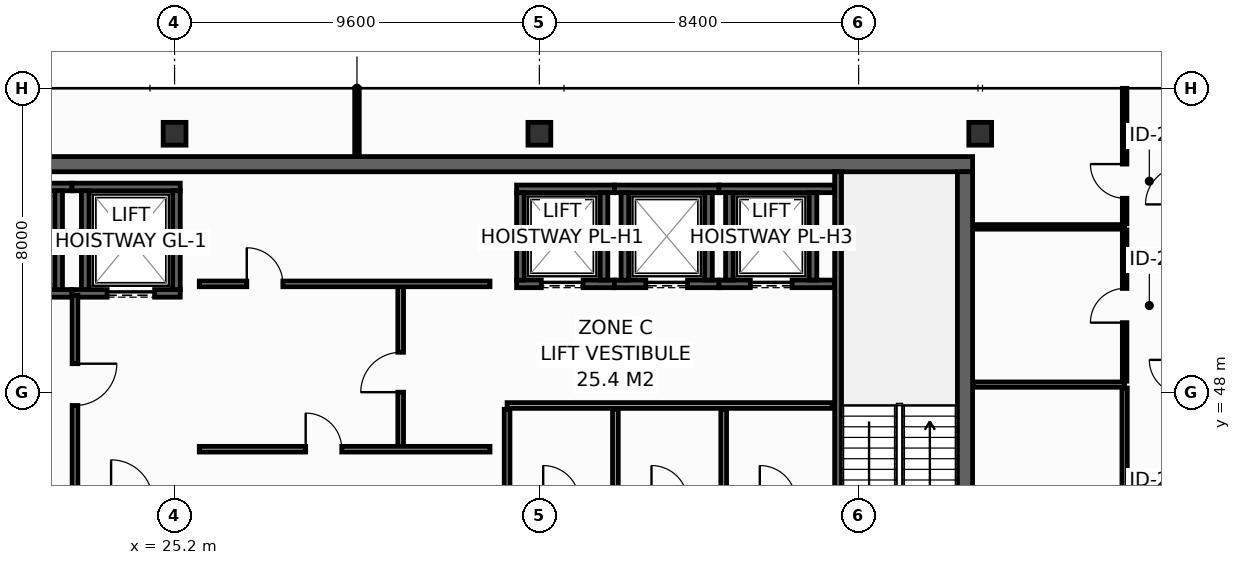
"""IFC4 building model, lengths in metres.
Left out: names, types, materials, properties, quantities, classifications, styles, units other than length and angle.
Written with IfcOpenShell. Run it as: python <this file> out.ifc"""

import sys

from ifc_helpers import new_model, si_unit, direction, frame, frame_2d, origin, origin_2d, place, context, subcontext, project, spatial, rectangle, hollow_rectangle, extrude, element, fill, save


model = new_model("IFC4")
c1 = context("Model", 3, precision=1e-05, world=origin(), true_north=direction((0.0, 1.0)))
c2 = subcontext(c1, "Body", "Model", "MODEL_VIEW")
j1 = project(units=[si_unit("LENGTHUNIT", "METRE"), si_unit("PLANEANGLEUNIT", "RADIAN")], contexts=[c1])
p1 = place(None, origin())
s1 = spatial("IfcSite", under=j1, at=p1, CompositionType="ELEMENT")
p2 = place(p1, origin())
s2 = spatial("IfcBuilding", under=s1, at=p2, CompositionType="ELEMENT")
p3 = place(p2, frame((0.0, 0.0, 268.6)))
s3 = spatial("IfcBuildingStorey", under=s2, at=p3, CompositionType="ELEMENT", Elevation=268.6)
p4 = place(p3, frame((13.7, 54.0, 0.0), z_axis=(0.0, 0.0, 1.0), x_axis=(1.0, 0.0, 0.0)))
e1 = element("IfcWall", 1, at=p4, inside=s3, PredefinedType="SHEAR", context=c2, shape_type="SweptSolid", body=[
    extrude(rectangle(XDim=32.5, YDim=0.4, at=frame_2d((16.25, 0.0))), origin(), (0.0, 0.0, 1.0), 3.55),
])
p5 = place(p3, frame((46.0, 43.4, 0.0), z_axis=(0.0, 0.0, 1.0), x_axis=(0.0, 1.0, 0.0)))
e2 = element("IfcWall", 2, at=p5, inside=s3, PredefinedType="SHEAR", context=c2, shape_type="SweptSolid", body=[
    extrude(rectangle(XDim=10.4, YDim=0.4, at=frame_2d((5.2, 0.0))), origin(), (0.0, 0.0, 1.0), 3.55),
])
for number, where, z_axis, x_axis in (
    (3, (25.2, 54.8, 0.0), (0.0, 0.0, 1.0), (1.0, 0.0, 0.0)),
    (4, (34.8, 54.8, 0.0), (0.0, 0.0, 1.0), (1.0, 0.0, 0.0)),
    (5, (46.4, 54.8, 0.0), (0.0, 0.0, 1.0), (1.0, 0.0, 0.0)),
):
    element("IfcColumn", number, at=place(p3, frame(where, z_axis=z_axis, x_axis=x_axis)), inside=s3, PredefinedType="COLUMN", context=c2, shape_type="SweptSolid", body=[
        extrude(hollow_rectangle(XDim=0.6, YDim=0.6, WallThickness=0.028, at=origin_2d()), origin(), (0.0, 0.0, 1.0), 3.8),
    ])
p6 = place(p3, frame((19.85, 50.6, 0.0), z_axis=(0.0, 0.0, 1.0), x_axis=(1.0, 0.0, 0.0)))
e6 = element("IfcWall", 6, at=p6, inside=s3, PredefinedType="SHEAR", context=c2, shape_type="SweptSolid", body=[
    extrude(rectangle(XDim=2.65, YDim=0.2, at=frame_2d((1.325, 0.0))), origin(), (0.0, 0.0, 1.0), 3.55),
])
p7 = place(p6, frame((0.675, 0.0, 0.0)))
e7 = element("IfcOpeningElement", 7, at=p7, cuts=e6, PredefinedType="OPENING", context=c2, shape_type="SweptSolid", body=[
    extrude(rectangle(XDim=1.25, YDim=2.3, at=frame_2d((0.625, 1.15))), frame((0.0, 0.11, 0.0), z_axis=(0.0, -1.0, 0.0), x_axis=(1.0, 0.0, 0.0)), (0.0, 0.0, 1.0), 0.22),
])
p8 = place(p3, frame((19.85, 53.4, 0.0), z_axis=(0.0, 0.0, 1.0), x_axis=(1.0, 0.0, 0.0)))
e8 = element("IfcWall", 8, at=p8, inside=s3, PredefinedType="SHEAR", context=c2, shape_type="SweptSolid", body=[
    extrude(rectangle(XDim=2.65, YDim=0.2, at=frame_2d((1.325, 0.0))), origin(), (0.0, 0.0, 1.0), 3.55),
])
p9 = place(p3, frame((22.15, 50.7, 0.0), z_axis=(0.0, 0.0, 1.0), x_axis=(0.0, 1.0, 0.0)))
e9 = element("IfcWall", 9, at=p9, inside=s3, PredefinedType="SHEAR", context=c2, shape_type="SweptSolid", body=[
    extrude(rectangle(XDim=2.6, YDim=0.2, at=frame_2d((1.3, 0.0))), origin(), (0.0, 0.0, 1.0), 3.55),
])
p10 = place(p3, frame((22.5, 50.6, 0.0), z_axis=(0.0, 0.0, 1.0), x_axis=(1.0, 0.0, 0.0)))
e10 = element("IfcWall", 10, at=p10, inside=s3, PredefinedType="SHEAR", context=c2, shape_type="SweptSolid", body=[
    extrude(rectangle(XDim=2.85, YDim=0.2, at=frame_2d((1.425, 0.0))), origin(), (0.0, 0.0, 1.0), 3.55),
])
p11 = place(p10, frame((0.925, 0.0, 0.0)))
e11 = element("IfcOpeningElement", 11, at=p11, cuts=e10, PredefinedType="OPENING", context=c2, shape_type="SweptSolid", body=[
    extrude(rectangle(XDim=1.25, YDim=2.3, at=frame_2d((0.625, 1.15))), frame((0.0, 0.11, 0.0), z_axis=(0.0, -1.0, 0.0), x_axis=(1.0, 0.0, 0.0)), (0.0, 0.0, 1.0), 0.22),
])
p12 = place(p3, frame((22.5, 53.4, 0.0), z_axis=(0.0, 0.0, 1.0), x_axis=(1.0, 0.0, 0.0)))
e12 = element("IfcWall", 12, at=p12, inside=s3, PredefinedType="SHEAR", context=c2, shape_type="SweptSolid", body=[
    extrude(rectangle(XDim=2.85, YDim=0.2, at=frame_2d((1.425, 0.0))), origin(), (0.0, 0.0, 1.0), 3.55),
])
for number, where, z_axis, x_axis in (
    (13, (22.85, 50.7, 0.0), (0.0, 0.0, 1.0), (0.0, 1.0, 0.0)),
    (14, (25.25, 50.7, 0.0), (0.0, 0.0, 1.0), (0.0, 1.0, 0.0)),
):
    element("IfcWall", number, at=place(p3, frame(where, z_axis=z_axis, x_axis=x_axis)), inside=s3, PredefinedType="SHEAR", context=c2, shape_type="SweptSolid", body=[
        extrude(rectangle(XDim=2.6, YDim=0.2, at=frame_2d((1.3, 0.0))), origin(), (0.0, 0.0, 1.0), 3.55),
    ])
p13 = place(p3, frame((34.2, 50.85, 0.0), z_axis=(0.0, 0.0, 1.0), x_axis=(1.0, 0.0, 0.0)))
e15 = element("IfcWall", 15, at=p13, inside=s3, PredefinedType="SHEAR", context=c2, shape_type="SweptSolid", body=[
    extrude(rectangle(XDim=2.575, YDim=0.2, at=frame_2d((1.288, 0.0))), origin(), (0.0, 0.0, 1.0), 3.55),
])
p14 = place(p13, frame((0.65, 0.0, 0.0)))
e16 = element("IfcOpeningElement", 16, at=p14, cuts=e15, PredefinedType="OPENING", context=c2, shape_type="SweptSolid", body=[
    extrude(rectangle(XDim=1.1, YDim=2.2, at=frame_2d((0.55, 1.1))), frame((0.0, 0.11, 0.0), z_axis=(0.0, -1.0, 0.0), x_axis=(1.0, 0.0, 0.0)), (0.0, 0.0, 1.0), 0.22),
])
p15 = place(p3, frame((34.2, 53.35, 0.0), z_axis=(0.0, 0.0, 1.0), x_axis=(1.0, 0.0, 0.0)))
e17 = element("IfcWall", 17, at=p15, inside=s3, PredefinedType="SHEAR", context=c2, shape_type="SweptSolid", body=[
    extrude(rectangle(XDim=2.575, YDim=0.2, at=frame_2d((1.288, 0.0))), origin(), (0.0, 0.0, 1.0), 3.55),
])
for number, where, z_axis, x_axis in (
    (18, (34.3, 50.95, 0.0), (0.0, 0.0, 1.0), (0.0, 1.0, 0.0)),
    (19, (36.5, 50.95, 0.0), (0.0, 0.0, 1.0), (0.0, 1.0, 0.0)),
):
    element("IfcWall", number, at=place(p3, frame(where, z_axis=z_axis, x_axis=x_axis)), inside=s3, PredefinedType="SHEAR", context=c2, shape_type="SweptSolid", body=[
        extrude(rectangle(XDim=2.3, YDim=0.2, at=frame_2d((1.15, 0.0))), origin(), (0.0, 0.0, 1.0), 3.55),
    ])
p16 = place(p3, frame((36.775, 50.85, 0.0), z_axis=(0.0, 0.0, 1.0), x_axis=(1.0, 0.0, 0.0)))
e20 = element("IfcWall", 20, at=p16, inside=s3, PredefinedType="SHEAR", context=c2, shape_type="SweptSolid", body=[
    extrude(rectangle(XDim=2.75, YDim=0.2, at=frame_2d((1.375, 0.0))), origin(), (0.0, 0.0, 1.0), 3.55),
])
p17 = place(p16, frame((0.825, 0.0, 0.0)))
e21 = element("IfcOpeningElement", 21, at=p17, cuts=e20, PredefinedType="OPENING", context=c2, shape_type="SweptSolid", body=[
    extrude(rectangle(XDim=1.1, YDim=2.2, at=frame_2d((0.55, 1.1))), frame((0.0, 0.11, 0.0), z_axis=(0.0, -1.0, 0.0), x_axis=(1.0, 0.0, 0.0)), (0.0, 0.0, 1.0), 0.22),
])
p18 = place(p3, frame((36.775, 53.35, 0.0), z_axis=(0.0, 0.0, 1.0), x_axis=(1.0, 0.0, 0.0)))
e22 = element("IfcWall", 22, at=p18, inside=s3, PredefinedType="SHEAR", context=c2, shape_type="SweptSolid", body=[
    extrude(rectangle(XDim=2.75, YDim=0.2, at=frame_2d((1.375, 0.0))), origin(), (0.0, 0.0, 1.0), 3.55),
])
for number, where, z_axis, x_axis in (
    (23, (37.05, 50.95, 0.0), (0.0, 0.0, 1.0), (0.0, 1.0, 0.0)),
    (24, (39.25, 50.95, 0.0), (0.0, 0.0, 1.0), (0.0, 1.0, 0.0)),
):
    element("IfcWall", number, at=place(p3, frame(where, z_axis=z_axis, x_axis=x_axis)), inside=s3, PredefinedType="SHEAR", context=c2, shape_type="SweptSolid", body=[
        extrude(rectangle(XDim=2.3, YDim=0.2, at=frame_2d((1.15, 0.0))), origin(), (0.0, 0.0, 1.0), 3.55),
    ])
p19 = place(p3, frame((39.525, 50.85, 0.0), z_axis=(0.0, 0.0, 1.0), x_axis=(1.0, 0.0, 0.0)))
e25 = element("IfcWall", 25, at=p19, inside=s3, PredefinedType="SHEAR", context=c2, shape_type="SweptSolid", body=[
    extrude(rectangle(XDim=3.045, YDim=0.2, at=frame_2d((1.522, 0.0))), origin(), (0.0, 0.0, 1.0), 3.55),
])
p20 = place(p19, frame((0.825, 0.0, 0.0)))
e26 = element("IfcOpeningElement", 26, at=p20, cuts=e25, PredefinedType="OPENING", context=c2, shape_type="SweptSolid", body=[
    extrude(rectangle(XDim=1.1, YDim=2.2, at=frame_2d((0.55, 1.1))), frame((0.0, 0.11, 0.0), z_axis=(0.0, -1.0, 0.0), x_axis=(1.0, 0.0, 0.0)), (0.0, 0.0, 1.0), 0.22),
])
p21 = place(p3, frame((39.525, 53.35, 0.0), z_axis=(0.0, 0.0, 1.0), x_axis=(1.0, 0.0, 0.0)))
e27 = element("IfcWall", 27, at=p21, inside=s3, PredefinedType="SHEAR", context=c2, shape_type="SweptSolid", body=[
    extrude(rectangle(XDim=3.045, YDim=0.2, at=frame_2d((1.522, 0.0))), origin(), (0.0, 0.0, 1.0), 3.55),
])
for number, where, z_axis, x_axis in (
    (28, (39.8, 50.95, 0.0), (0.0, 0.0, 1.0), (0.0, 1.0, 0.0)),
    (29, (42.0, 50.95, 0.0), (0.0, 0.0, 1.0), (0.0, 1.0, 0.0)),
):
    element("IfcWall", number, at=place(p3, frame(where, z_axis=z_axis, x_axis=x_axis)), inside=s3, PredefinedType="SHEAR", context=c2, shape_type="SweptSolid", body=[
        extrude(rectangle(XDim=2.3, YDim=0.2, at=frame_2d((1.15, 0.0))), origin(), (0.0, 0.0, 1.0), 3.55),
    ])
p22 = place(p3, frame((42.66, 53.8, 0.0), z_axis=(0.0, 0.0, 1.0), x_axis=(0.0, -1.0, 0.0)))
e30 = element("IfcWall", 30, at=p22, inside=s3, PredefinedType="SHEAR", context=c2, shape_type="SweptSolid", body=[
    extrude(rectangle(XDim=10.4, YDim=0.18, at=frame_2d((5.2, 0.0))), origin(), (0.0, 0.0, 1.0), 3.55),
])
p23 = place(p22, frame((8.99, 0.0, 0.0)))
e31 = element("IfcOpeningElement", 31, at=p23, cuts=e30, PredefinedType="OPENING", context=c2, shape_type="SweptSolid", body=[
    extrude(rectangle(XDim=1.1, YDim=2.15, at=frame_2d((0.55, 1.075))), frame((0.0, 0.1, 0.0), z_axis=(0.0, -1.0, 0.0), x_axis=(1.0, 0.0, 0.0)), (0.0, 0.0, 1.0), 0.2),
])
p24 = place(p3, frame((22.58, 50.55, 0.0), z_axis=(0.0, 0.0, 1.0), x_axis=(0.0, -1.0, 0.0)))
e32 = element("IfcWall", 32, at=p24, inside=s3, PredefinedType="PARTITIONING", context=c2, shape_type="SweptSolid", body=[
    extrude(rectangle(XDim=5.33, YDim=0.15, at=frame_2d((2.665, 0.0))), origin(), (0.0, 0.0, 1.0), 3.55),
])
p25 = place(p24, frame((1.8, 0.0, 0.0)))
e33 = element("IfcOpeningElement", 33, at=p25, cuts=e32, PredefinedType="OPENING", context=c2, shape_type="SweptSolid", body=[
    extrude(rectangle(XDim=1.1, YDim=2.15, at=frame_2d((0.55, 1.075))), frame((0.0, 0.085, 0.0), z_axis=(0.0, -1.0, 0.0), x_axis=(1.0, 0.0, 0.0)), (0.0, 0.0, 1.0), 0.17),
])
p26 = place(p3, frame((31.15, 46.5, 0.0), z_axis=(0.0, 0.0, 1.0), x_axis=(0.0, 1.0, 0.0)))
e34 = element("IfcWall", 34, at=p26, inside=s3, PredefinedType="PARTITIONING", context=c2, shape_type="SweptSolid", body=[
    extrude(rectangle(XDim=4.35, YDim=0.15, at=frame_2d((2.175, 0.0))), origin(), (0.0, 0.0, 1.0), 3.55),
])
p27 = place(p26, frame((1.5, 0.0, 0.0)))
e35 = element("IfcOpeningElement", 35, at=p27, cuts=e34, PredefinedType="OPENING", context=c2, shape_type="SweptSolid", body=[
    extrude(rectangle(XDim=1.05, YDim=2.15, at=frame_2d((0.525, 1.075))), frame((0.0, 0.085, 0.0), z_axis=(0.0, -1.0, 0.0), x_axis=(1.0, 0.0, 0.0)), (0.0, 0.0, 1.0), 0.17),
])
p28 = place(p3, frame((33.95, 47.65, 0.0), z_axis=(0.0, 0.0, 1.0), x_axis=(1.0, 0.0, 0.0)))
e36 = element("IfcWall", 36, at=p28, inside=s3, PredefinedType="PARTITIONING", context=c2, shape_type="SweptSolid", body=[
    extrude(rectangle(XDim=8.55, YDim=0.15, at=frame_2d((4.275, 0.0))), origin(), (0.0, 0.0, 1.0), 3.55),
])
for number, where, z_axis, x_axis in (
    (37, (33.95, 45.22, 0.0), (0.0, 0.0, 1.0), (0.0, 1.0, 0.0)),
    (38, (36.8, 45.22, 0.0), (0.0, 0.0, 1.0), (0.0, 1.0, 0.0)),
    (39, (39.65, 45.22, 0.0), (0.0, 0.0, 1.0), (0.0, 1.0, 0.0)),
):
    element("IfcWall", number, at=place(p3, frame(where, z_axis=z_axis, x_axis=x_axis)), inside=s3, PredefinedType="PARTITIONING", context=c2, shape_type="SweptSolid", body=[
        extrude(rectangle(XDim=2.33, YDim=0.15, at=frame_2d((1.165, 0.0))), origin(), (0.0, 0.0, 1.0), 3.55),
    ])
p29 = place(p3, frame((25.85, 50.85, 0.0), z_axis=(0.0, 0.0, 1.0), x_axis=(1.0, 0.0, 0.0)))
e40 = element("IfcWall", 40, at=p29, inside=s3, PredefinedType="PARTITIONING", context=c2, shape_type="SweptSolid", body=[
    extrude(rectangle(XDim=7.65, YDim=0.15, at=frame_2d((3.825, 0.0))), origin(), (0.0, 0.0, 1.0), 3.55),
])
p30 = place(p29, frame((1.25, 0.0, 0.0)))
e41 = element("IfcOpeningElement", 41, at=p30, cuts=e40, PredefinedType="OPENING", context=c2, shape_type="SweptSolid", body=[
    extrude(rectangle(XDim=0.95, YDim=2.15, at=frame_2d((0.475, 1.075))), frame((0.0, 0.085, 0.0), z_axis=(0.0, -1.0, 0.0), x_axis=(1.0, 0.0, 0.0)), (0.0, 0.0, 1.0), 0.17),
])
p31 = place(p3, frame((25.85, 46.5, 0.0), z_axis=(0.0, 0.0, 1.0), x_axis=(1.0, 0.0, 0.0)))
e42 = element("IfcWall", 42, at=p31, inside=s3, PredefinedType="PARTITIONING", context=c2, shape_type="SweptSolid", body=[
    extrude(rectangle(XDim=7.65, YDim=0.15, at=frame_2d((3.825, 0.0))), origin(), (0.0, 0.0, 1.0), 3.55),
])
p32 = place(p31, frame((2.8, 0.0, 0.0)))
e43 = element("IfcOpeningElement", 43, at=p32, cuts=e42, PredefinedType="OPENING", context=c2, shape_type="SweptSolid", body=[
    extrude(rectangle(XDim=0.95, YDim=2.15, at=frame_2d((0.475, 1.075))), frame((0.0, 0.085, 0.0), z_axis=(0.0, -1.0, 0.0), x_axis=(1.0, 0.0, 0.0)), (0.0, 0.0, 1.0), 0.17),
])
p33 = place(p3, frame((46.22, 48.2, 0.0), z_axis=(0.0, 0.0, 1.0), x_axis=(1.0, 0.0, 0.0)))
e44 = element("IfcWall", 44, at=p33, inside=s3, PredefinedType="PARTITIONING", context=c2, shape_type="SweptSolid", body=[
    extrude(rectangle(XDim=3.98, YDim=0.14, at=frame_2d((1.99, 0.0))), origin(), (0.0, 0.0, 1.0), 3.55),
])
p34 = place(p3, frame((50.2, 40.84, 0.0), z_axis=(0.0, 0.0, 1.0), x_axis=(0.0, 1.0, 0.0)))
e45 = element("IfcWall", 45, at=p34, inside=s3, PredefinedType="PARTITIONING", context=c2, shape_type="SweptSolid", body=[
    extrude(rectangle(XDim=7.27, YDim=0.14, at=frame_2d((3.635, 0.0))), origin(), (0.0, 0.0, 1.0), 2.947),
])
p35 = place(p34, frame((3.185, 0.0, 0.0)))
e46 = element("IfcOpeningElement", 46, at=p35, cuts=e45, PredefinedType="OPENING", context=c2, shape_type="SweptSolid", body=[
    extrude(rectangle(XDim=0.9, YDim=2.1, at=frame_2d((0.45, 1.05))), frame((0.0, 0.08, 0.0), z_axis=(0.0, -1.0, 0.0), x_axis=(1.0, 0.0, 0.0)), (0.0, 0.0, 1.0), 0.16),
])
p36 = place(p3, frame((46.22, 52.35, 0.0), z_axis=(0.0, 0.0, 1.0), x_axis=(1.0, 0.0, 0.0)))
e47 = element("IfcWall", 47, at=p36, inside=s3, PredefinedType="PARTITIONING", context=c2, shape_type="SweptSolid", body=[
    extrude(rectangle(XDim=3.98, YDim=0.12, at=frame_2d((1.99, 0.0))), origin(), (0.0, 0.0, 1.0), 3.55),
])
p37 = place(p3, frame((30.0, 54.22, 0.0), z_axis=(0.0, 0.0, 1.0), x_axis=(0.0, 1.0, 0.0)))
e48 = element("IfcWall", 48, at=p37, inside=s3, PredefinedType="PARTITIONING", context=c2, shape_type="SweptSolid", body=[
    extrude(rectangle(XDim=1.775, YDim=0.12, at=frame_2d((0.888, 0.0))), origin(), (0.0, 0.0, 1.0), 2.935),
])
p38 = place(p3, frame((50.2, 48.29, 0.0), z_axis=(0.0, 0.0, 1.0), x_axis=(0.0, 1.0, 0.0)))
e49 = element("IfcWall", 49, at=p38, inside=s3, PredefinedType="PARTITIONING", context=c2, shape_type="SweptSolid", body=[
    extrude(rectangle(XDim=3.98, YDim=0.12, at=frame_2d((1.99, 0.0))), origin(), (0.0, 0.0, 1.0), 3.55),
])
p39 = place(p38, frame((1.54, 0.0, 0.0)))
e50 = element("IfcOpeningElement", 50, at=p39, cuts=e49, PredefinedType="OPENING", context=c2, shape_type="SweptSolid", body=[
    extrude(rectangle(XDim=0.9, YDim=2.1, at=frame_2d((0.45, 1.05))), frame((0.0, 0.07, 0.0), z_axis=(0.0, -1.0, 0.0), x_axis=(1.0, 0.0, 0.0)), (0.0, 0.0, 1.0), 0.14),
])
p40 = place(p3, frame((50.2, 52.43, 0.0), z_axis=(0.0, 0.0, 1.0), x_axis=(0.0, 1.0, 0.0)))
e51 = element("IfcWall", 51, at=p40, inside=s3, PredefinedType="PARTITIONING", context=c2, shape_type="SweptSolid", body=[
    extrude(rectangle(XDim=3.565, YDim=0.12, at=frame_2d((1.783, 0.0))), origin(), (0.0, 0.0, 1.0), 2.935),
])
p41 = place(p40, frame((0.672, 0.0, 0.0)))
e52 = element("IfcOpeningElement", 52, at=p41, cuts=e51, PredefinedType="OPENING", context=c2, shape_type="SweptSolid", body=[
    extrude(rectangle(XDim=0.9, YDim=2.1, at=frame_2d((0.45, 1.05))), frame((0.0, 0.07, 0.0), z_axis=(0.0, -1.0, 0.0), x_axis=(1.0, 0.0, 0.0)), (0.0, 0.0, 1.0), 0.14),
])
p42 = place(p11, origin())
e53 = element("IfcDoor", 53, at=p42, inside=s3, OperationType="SLIDING_TO_LEFT", PredefinedType="DOOR", context=c2, shape_type="SweptSolid", body=[
    extrude(rectangle(XDim=1.25, YDim=2.3, at=frame_2d((0.625, 1.15))), frame((0.0, 0.025, 0.0), z_axis=(0.0, -1.0, 0.0), x_axis=(1.0, 0.0, 0.0)), (0.0, 0.0, 1.0), 0.05),
])
fill(e11, e53)
p43 = place(p14, origin())
e54 = element("IfcDoor", 54, at=p43, inside=s3, OperationType="SLIDING_TO_LEFT", PredefinedType="DOOR", context=c2, shape_type="SweptSolid", body=[
    extrude(rectangle(XDim=1.1, YDim=2.2, at=frame_2d((0.55, 1.1))), frame((0.0, 0.025, 0.0), z_axis=(0.0, -1.0, 0.0), x_axis=(1.0, 0.0, 0.0)), (0.0, 0.0, 1.0), 0.05),
])
fill(e16, e54)
p44 = place(p17, origin())
e55 = element("IfcDoor", 55, at=p44, inside=s3, OperationType="SLIDING_TO_LEFT", PredefinedType="DOOR", context=c2, shape_type="SweptSolid", body=[
    extrude(rectangle(XDim=1.1, YDim=2.2, at=frame_2d((0.55, 1.1))), frame((0.0, 0.025, 0.0), z_axis=(0.0, -1.0, 0.0), x_axis=(1.0, 0.0, 0.0)), (0.0, 0.0, 1.0), 0.05),
])
fill(e21, e55)
p45 = place(p20, origin())
e56 = element("IfcDoor", 56, at=p45, inside=s3, OperationType="SLIDING_TO_LEFT", PredefinedType="DOOR", context=c2, shape_type="SweptSolid", body=[
    extrude(rectangle(XDim=1.1, YDim=2.2, at=frame_2d((0.55, 1.1))), frame((0.0, 0.025, 0.0), z_axis=(0.0, -1.0, 0.0), x_axis=(1.0, 0.0, 0.0)), (0.0, 0.0, 1.0), 0.05),
])
fill(e26, e56)
p46 = place(p25, origin())
e57 = element("IfcDoor", 57, at=p46, inside=s3, OperationType="SINGLE_SWING_LEFT", PredefinedType="DOOR", context=c2, shape_type="SweptSolid", body=[
    extrude(rectangle(XDim=1.1, YDim=2.15, at=frame_2d((0.55, 1.075))), frame((0.0, 0.025, 0.0), z_axis=(0.0, -1.0, 0.0), x_axis=(1.0, 0.0, 0.0)), (0.0, 0.0, 1.0), 0.05),
])
fill(e33, e57)
p47 = place(p27, origin())
e58 = element("IfcDoor", 58, at=p47, inside=s3, OperationType="SINGLE_SWING_LEFT", PredefinedType="DOOR", context=c2, shape_type="SweptSolid", body=[
    extrude(rectangle(XDim=1.05, YDim=2.15, at=frame_2d((0.525, 1.075))), frame((0.0, 0.025, 0.0), z_axis=(0.0, -1.0, 0.0), x_axis=(1.0, 0.0, 0.0)), (0.0, 0.0, 1.0), 0.05),
])
fill(e35, e58)
p48 = place(p30, origin())
e59 = element("IfcDoor", 59, at=p48, inside=s3, OperationType="SINGLE_SWING_LEFT", PredefinedType="DOOR", context=c2, shape_type="SweptSolid", body=[
    extrude(rectangle(XDim=0.95, YDim=2.15, at=frame_2d((0.475, 1.075))), frame((0.0, 0.025, 0.0), z_axis=(0.0, -1.0, 0.0), x_axis=(1.0, 0.0, 0.0)), (0.0, 0.0, 1.0), 0.05),
])
fill(e41, e59)
p49 = place(p32, origin())
e60 = element("IfcDoor", 60, at=p49, inside=s3, OperationType="SINGLE_SWING_LEFT", PredefinedType="DOOR", context=c2, shape_type="SweptSolid", body=[
    extrude(rectangle(XDim=0.95, YDim=2.15, at=frame_2d((0.475, 1.075))), frame((0.0, 0.025, 0.0), z_axis=(0.0, -1.0, 0.0), x_axis=(1.0, 0.0, 0.0)), (0.0, 0.0, 1.0), 0.05),
])
fill(e43, e60)
p50 = place(p39, origin())
e61 = element("IfcDoor", 61, at=p50, inside=s3, OperationType="SINGLE_SWING_LEFT", PredefinedType="DOOR", context=c2, shape_type="SweptSolid", body=[
    extrude(rectangle(XDim=0.9, YDim=2.1, at=frame_2d((0.45, 1.05))), frame((0.0, 0.025, 0.0), z_axis=(0.0, -1.0, 0.0), x_axis=(1.0, 0.0, 0.0)), (0.0, 0.0, 1.0), 0.05),
])
fill(e50, e61)
p51 = place(p41, origin())
e62 = element("IfcDoor", 62, at=p51, inside=s3, OperationType="SINGLE_SWING_RIGHT", PredefinedType="DOOR", context=c2, shape_type="SweptSolid", body=[
    extrude(rectangle(XDim=0.9, YDim=2.1, at=frame_2d((0.45, 1.05))), frame((0.0, 0.025, 0.0), z_axis=(0.0, -1.0, 0.0), x_axis=(1.0, 0.0, 0.0)), (0.0, 0.0, 1.0), 0.05),
])
fill(e52, e62)
save(model, sys.argv[1])
